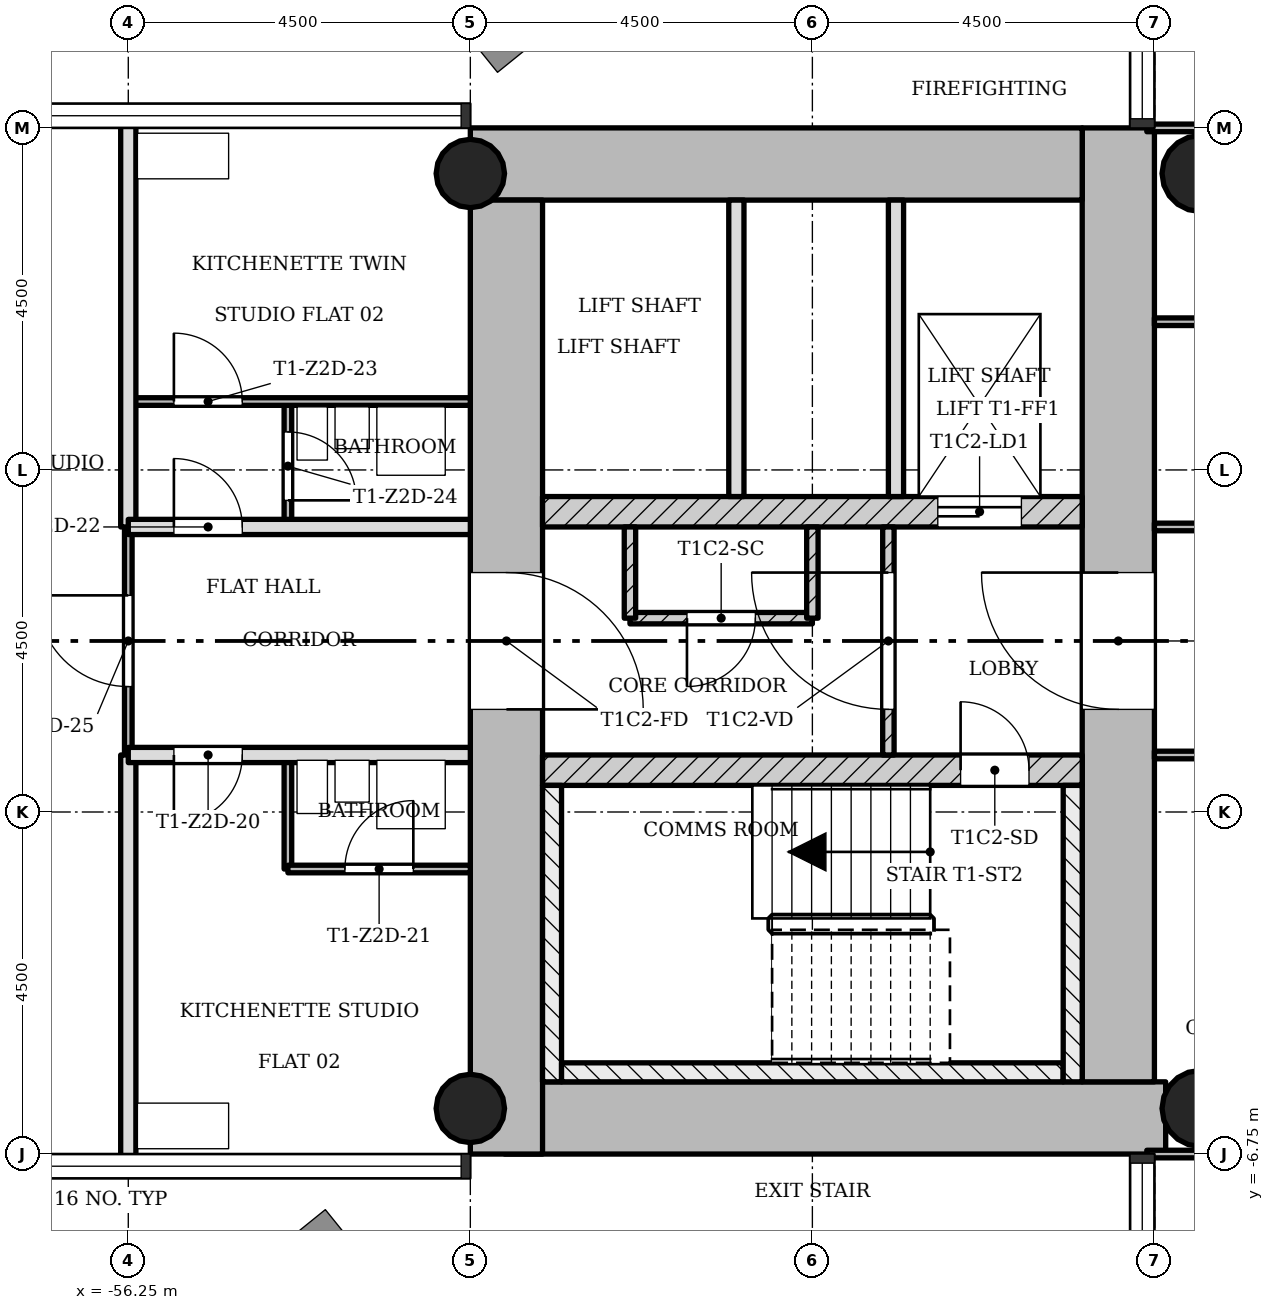
"""IFC4 building model, lengths in metres.
Left out: names, types, materials, properties, quantities, classifications, styles, units other than length and angle.
Written with IfcOpenShell. Run it as: python <this file> out.ifc"""

import sys

from ifc_helpers import new_model, si_unit, direction, frame, frame_2d, origin, origin_2d, place, context, subcontext, project, spatial, rectangle, hollow_circle, extrude, element, fill, save


model = new_model("IFC4")
c1 = context("Model", 3, precision=1e-05, world=origin(), true_north=direction((0.0, 1.0)))
c2 = subcontext(c1, "Body", "Model", "MODEL_VIEW")
j1 = project(units=[si_unit("LENGTHUNIT", "METRE"), si_unit("PLANEANGLEUNIT", "RADIAN")], contexts=[c1])
p1 = place(None, origin())
s1 = spatial("IfcSite", under=j1, at=p1, CompositionType="ELEMENT")
p2 = place(p1, origin())
s2 = spatial("IfcBuilding", under=s1, at=p2, CompositionType="ELEMENT")
p3 = place(p2, frame((0.0, 0.0, 120.8)))
s3 = spatial("IfcBuildingStorey", under=s2, at=p3, CompositionType="ELEMENT", Elevation=120.8)
p4 = place(p3, frame((-51.298, -6.275, 0.0), z_axis=(0.0, 0.0, 1.0), x_axis=(1.0, 0.0, 0.0)))
e1 = element("IfcWall", 1, at=p4, inside=s3, PredefinedType="SHEAR", context=c2, shape_type="SweptSolid", body=[
    extrude(rectangle(XDim=8.696, YDim=0.95, at=frame_2d((4.348, 0.0))), origin(), (0.0, 0.0, 1.0), 3.4),
])
p5 = place(p3, frame((-43.225, -5.8, 0.0), z_axis=(0.0, 0.0, 1.0), x_axis=(0.0, 1.0, 0.0)))
e2 = element("IfcWall", 2, at=p5, inside=s3, PredefinedType="SHEAR", context=c2, shape_type="SweptSolid", body=[
    extrude(rectangle(XDim=12.55, YDim=0.95, at=frame_2d((6.275, 0.0))), origin(), (0.0, 0.0, 1.0), 3.4),
])
p6 = place(p5, frame((4.9, 0.0, 0.0)))
e3 = element("IfcOpeningElement", 3, at=p6, cuts=e2, PredefinedType="OPENING", context=c2, shape_type="SweptSolid", body=[
    extrude(rectangle(XDim=1.8, YDim=2.1, at=frame_2d((0.9, 1.05))), frame((0.0, 0.485, 0.0), z_axis=(0.0, -1.0, 0.0), x_axis=(1.0, 0.0, 0.0)), (0.0, 0.0, 1.0), 0.97),
])
p7 = place(p3, frame((-43.7, 6.275, 0.0), z_axis=(0.0, 0.0, 1.0), x_axis=(-1.0, 0.0, 0.0)))
e4 = element("IfcWall", 4, at=p7, inside=s3, PredefinedType="SHEAR", context=c2, shape_type="SweptSolid", body=[
    extrude(rectangle(XDim=8.05, YDim=0.95, at=frame_2d((4.025, 0.0))), origin(), (0.0, 0.0, 1.0), 3.4),
])
p8 = place(p3, frame((-51.275, 5.8, 0.0), z_axis=(0.0, 0.0, 1.0), x_axis=(0.0, -1.0, 0.0)))
e5 = element("IfcWall", 5, at=p8, inside=s3, PredefinedType="SHEAR", context=c2, shape_type="SweptSolid", body=[
    extrude(rectangle(XDim=12.55, YDim=0.95, at=frame_2d((6.275, 0.0))), origin(), (0.0, 0.0, 1.0), 3.4),
])
p9 = place(p8, frame((4.9, 0.0, 0.0)))
e6 = element("IfcOpeningElement", 6, at=p9, cuts=e5, PredefinedType="OPENING", context=c2, shape_type="SweptSolid", body=[
    extrude(rectangle(XDim=1.8, YDim=2.1, at=frame_2d((0.9, 1.05))), frame((0.0, 0.485, 0.0), z_axis=(0.0, -1.0, 0.0), x_axis=(1.0, 0.0, 0.0)), (0.0, 0.0, 1.0), 0.97),
])
p10 = place(p3, frame((-50.8, -1.7, 0.0), z_axis=(0.0, 0.0, 1.0), x_axis=(1.0, 0.0, 0.0)))
e7 = element("IfcWall", 7, at=p10, inside=s3, PredefinedType="SHEAR", context=c2, shape_type="SweptSolid", body=[
    extrude(rectangle(XDim=7.1, YDim=0.4, at=frame_2d((3.55, 0.0))), origin(), (0.0, 0.0, 1.0), 3.4),
])
p11 = place(p10, frame((5.5, 0.0, 0.0)))
e8 = element("IfcOpeningElement", 8, at=p11, cuts=e7, PredefinedType="OPENING", context=c2, shape_type="SweptSolid", body=[
    extrude(rectangle(XDim=0.9, YDim=2.1, at=frame_2d((0.45, 1.05))), frame((0.0, 0.21, 0.0), z_axis=(0.0, -1.0, 0.0), x_axis=(1.0, 0.0, 0.0)), (0.0, 0.0, 1.0), 0.42),
])
p12 = place(p3, frame((-50.8, 1.7, 0.0), z_axis=(0.0, 0.0, 1.0), x_axis=(1.0, 0.0, 0.0)))
e9 = element("IfcWall", 9, at=p12, inside=s3, PredefinedType="SHEAR", context=c2, shape_type="SweptSolid", body=[
    extrude(rectangle(XDim=7.1, YDim=0.4, at=frame_2d((3.55, 0.0))), origin(), (0.0, 0.0, 1.0), 3.4),
])
p13 = place(p12, frame((5.2, 0.0, 0.0)))
e10 = element("IfcOpeningElement", 10, at=p13, cuts=e9, PredefinedType="OPENING", context=c2, shape_type="SweptSolid", body=[
    extrude(rectangle(XDim=1.1, YDim=2.1, at=frame_2d((0.55, 1.05))), frame((0.0, 0.21, 0.0), z_axis=(0.0, -1.0, 0.0), x_axis=(1.0, 0.0, 0.0)), (0.0, 0.0, 1.0), 0.42),
])
for number, where, z_axis, x_axis in (
    (11, (-51.75, -6.15, 0.0), (0.0, 0.0, 1.0), (1.0, 0.0, 0.0)),
    (12, (-51.75, 6.15, 0.0), (0.0, 0.0, 1.0), (1.0, 0.0, 0.0)),
):
    element("IfcColumn", number, at=place(p3, frame(where, z_axis=z_axis, x_axis=x_axis)), inside=s3, PredefinedType="COLUMN", context=c2, shape_type="SweptSolid", body=[
        extrude(hollow_circle(Radius=0.45, WallThickness=0.032, at=origin_2d()), origin(), (0.0, 0.0, 1.0), 3.4),
    ])
for number, where, z_axis, x_axis in (
    (13, (-42.15, -6.15, 0.0), (0.0, 0.0, 1.0), (1.0, 0.0, 0.0)),
    (14, (-42.15, 6.15, 0.0), (0.0, 0.0, 1.0), (1.0, 0.0, 0.0)),
):
    element("IfcColumn", number, at=place(p3, frame(where, z_axis=z_axis, x_axis=x_axis)), inside=s3, PredefinedType="COLUMN", context=c2, shape_type="SweptSolid", body=[
        extrude(hollow_circle(Radius=0.5, WallThickness=0.036, at=origin_2d()), origin(), (0.0, 0.0, 1.0), 3.4),
    ])
p14 = place(p3, frame((-46.25, 1.5, 0.0), z_axis=(0.0, 0.0, 1.0), x_axis=(0.0, -1.0, 0.0)))
e15 = element("IfcWall", 15, at=p14, inside=s3, PredefinedType="PARTITIONING", context=c2, shape_type="SweptSolid", body=[
    extrude(rectangle(XDim=3.0, YDim=0.15, at=frame_2d((1.5, 0.0))), origin(), (0.0, 0.0, 1.0), 3.0),
])
p15 = place(p14, frame((0.6, 0.0, 0.0)))
e16 = element("IfcOpeningElement", 16, at=p15, cuts=e15, PredefinedType="OPENING", context=c2, shape_type="SweptSolid", body=[
    extrude(rectangle(XDim=1.8, YDim=2.1, at=frame_2d((0.9, 1.05))), frame((0.0, 0.085, 0.0), z_axis=(0.0, -1.0, 0.0), x_axis=(1.0, 0.0, 0.0)), (0.0, 0.0, 1.0), 0.17),
])
for number, where, z_axis, x_axis in (
    (17, (-46.15, 5.8, 0.0), (0.0, 0.0, 1.0), (0.0, -1.0, 0.0)),
    (18, (-48.25, 5.8, 0.0), (0.0, 0.0, 1.0), (0.0, -1.0, 0.0)),
):
    element("IfcWall", number, at=place(p3, frame(where, z_axis=z_axis, x_axis=x_axis)), inside=s3, PredefinedType="SOLIDWALL", context=c2, shape_type="SweptSolid", body=[
        extrude(rectangle(XDim=3.9, YDim=0.2, at=frame_2d((1.95, 0.0))), origin(), (0.0, 0.0, 1.0), 3.0),
    ])
p16 = place(p3, frame((-47.25, 0.3, 0.0), z_axis=(0.0, 0.0, 1.0), x_axis=(-1.0, 0.0, 0.0)))
e19 = element("IfcWall", 19, at=p16, inside=s3, PredefinedType="PARTITIONING", context=c2, shape_type="SweptSolid", body=[
    extrude(rectangle(XDim=2.4, YDim=0.15, at=frame_2d((1.2, 0.0))), origin(), (0.0, 0.0, 1.0), 3.0),
])
p17 = place(p16, frame((0.75, 0.0, 0.0)))
e20 = element("IfcOpeningElement", 20, at=p17, cuts=e19, PredefinedType="OPENING", context=c2, shape_type="SweptSolid", body=[
    extrude(rectangle(XDim=0.9, YDim=2.1, at=frame_2d((0.45, 1.05))), frame((0.0, 0.085, 0.0), z_axis=(0.0, -1.0, 0.0), x_axis=(1.0, 0.0, 0.0)), (0.0, 0.0, 1.0), 0.17),
])
for number, where, z_axis, x_axis in (
    (21, (-47.25, 0.3, 0.0), (0.0, 0.0, 1.0), (0.0, 1.0, 0.0)),
    (22, (-49.65, 0.3, 0.0), (0.0, 0.0, 1.0), (0.0, 1.0, 0.0)),
):
    element("IfcWall", number, at=place(p3, frame(where, z_axis=z_axis, x_axis=x_axis)), inside=s3, PredefinedType="PARTITIONING", context=c2, shape_type="SweptSolid", body=[
        extrude(rectangle(XDim=1.2, YDim=0.15, at=frame_2d((0.6, 0.0))), origin(), (0.0, 0.0, 1.0), 3.0),
    ])
p18 = place(p3, frame((-56.25, -1.5, 0.0), z_axis=(0.0, 0.0, 1.0), x_axis=(0.0, 1.0, 0.0)))
e23 = element("IfcWall", 23, at=p18, inside=s3, PredefinedType="PARTITIONING", context=c2, shape_type="SweptSolid", body=[
    extrude(rectangle(XDim=3.0, YDim=0.1, at=frame_2d((1.5, 0.0))), origin(), (0.0, 0.0, 1.0), 3.0),
])
p19 = place(p18, frame((0.9, 0.0, 0.0)))
e24 = element("IfcOpeningElement", 24, at=p19, cuts=e23, PredefinedType="OPENING", context=c2, shape_type="SweptSolid", body=[
    extrude(rectangle(XDim=1.2, YDim=2.1, at=frame_2d((0.6, 1.05))), frame((0.0, 0.06, 0.0), z_axis=(0.0, -1.0, 0.0), x_axis=(1.0, 0.0, 0.0)), (0.0, 0.0, 1.0), 0.12),
])
for number, where, z_axis, x_axis in (
    (25, (-56.25, -6.85, 0.0), (0.0, 0.0, 1.0), (0.0, 1.0, 0.0)),
    (26, (-56.25, 1.5, 0.0), (0.0, 0.0, 1.0), (0.0, 1.0, 0.0)),
):
    element("IfcWall", number, at=place(p3, frame(where, z_axis=z_axis, x_axis=x_axis)), inside=s3, PredefinedType="SOLIDWALL", context=c2, shape_type="SweptSolid", body=[
        extrude(rectangle(XDim=5.35, YDim=0.2, at=frame_2d((2.675, 0.0))), origin(), (0.0, 0.0, 1.0), 3.0),
    ])
p20 = place(p3, frame((-54.15, -3.0, 0.0), z_axis=(0.0, 0.0, 1.0), x_axis=(0.0, 1.0, 0.0)))
e27 = element("IfcWall", 27, at=p20, inside=s3, PredefinedType="PARTITIONING", context=c2, shape_type="SweptSolid", body=[
    extrude(rectangle(XDim=1.5, YDim=0.1, at=frame_2d((0.75, 0.0))), origin(), (0.0, 0.0, 1.0), 3.0),
])
p21 = place(p3, frame((-54.15, 1.5, 0.0), z_axis=(0.0, 0.0, 1.0), x_axis=(0.0, 1.0, 0.0)))
e28 = element("IfcWall", 28, at=p21, inside=s3, PredefinedType="PARTITIONING", context=c2, shape_type="SweptSolid", body=[
    extrude(rectangle(XDim=1.65, YDim=0.1, at=frame_2d((0.825, 0.0))), origin(), (0.0, 0.0, 1.0), 3.0),
])
p22 = place(p21, frame((0.35, 0.0, 0.0)))
e29 = element("IfcOpeningElement", 29, at=p22, cuts=e28, PredefinedType="OPENING", context=c2, shape_type="SweptSolid", body=[
    extrude(rectangle(XDim=0.9, YDim=2.1, at=frame_2d((0.45, 1.05))), frame((0.0, 0.06, 0.0), z_axis=(0.0, -1.0, 0.0), x_axis=(1.0, 0.0, 0.0)), (0.0, 0.0, 1.0), 0.12),
])
p23 = place(p3, frame((-42.85, -6.75, 0.0), z_axis=(0.0, 0.0, 1.0), x_axis=(1.0, 0.0, 0.0)))
e30 = element("IfcWall", 30, at=p23, inside=s3, PredefinedType="PARTITIONING", context=c2, shape_type="SweptSolid", body=[
    extrude(rectangle(XDim=5.95, YDim=0.1, at=frame_2d((2.975, 0.0))), origin(), (0.0, 0.0, 1.0), 3.0),
])
p24 = place(p3, frame((-54.15, -3.0, 0.0), z_axis=(0.0, 0.0, 1.0), x_axis=(1.0, 0.0, 0.0)))
e31 = element("IfcWall", 31, at=p24, inside=s3, PredefinedType="PARTITIONING", context=c2, shape_type="SweptSolid", body=[
    extrude(rectangle(XDim=2.4, YDim=0.1, at=frame_2d((1.2, 0.0))), origin(), (0.0, 0.0, 1.0), 3.0),
])
p25 = place(p24, frame((0.75, 0.0, 0.0)))
e32 = element("IfcOpeningElement", 32, at=p25, cuts=e31, PredefinedType="OPENING", context=c2, shape_type="SweptSolid", body=[
    extrude(rectangle(XDim=0.9, YDim=2.1, at=frame_2d((0.45, 1.05))), frame((0.0, 0.06, 0.0), z_axis=(0.0, -1.0, 0.0), x_axis=(1.0, 0.0, 0.0)), (0.0, 0.0, 1.0), 0.12),
])
p26 = place(p3, frame((-42.75, -1.5, 0.0), z_axis=(0.0, 0.0, 1.0), x_axis=(1.0, 0.0, 0.0)))
e33 = element("IfcWall", 33, at=p26, inside=s3, PredefinedType="PARTITIONING", context=c2, shape_type="SweptSolid", body=[
    extrude(rectangle(XDim=5.85, YDim=0.1, at=frame_2d((2.925, 0.0))), origin(), (0.0, 0.0, 1.0), 3.0),
])
p27 = place(p26, frame((2.475, 0.0, 0.0)))
e34 = element("IfcOpeningElement", 34, at=p27, cuts=e33, PredefinedType="OPENING", context=c2, shape_type="SweptSolid", body=[
    extrude(rectangle(XDim=0.9, YDim=2.1, at=frame_2d((0.45, 1.05))), frame((0.0, 0.06, 0.0), z_axis=(0.0, -1.0, 0.0), x_axis=(1.0, 0.0, 0.0)), (0.0, 0.0, 1.0), 0.12),
])
p28 = place(p3, frame((-56.25, -1.5, 0.0), z_axis=(0.0, 0.0, 1.0), x_axis=(1.0, 0.0, 0.0)))
e35 = element("IfcWall", 35, at=p28, inside=s3, PredefinedType="SOLIDWALL", context=c2, shape_type="SweptSolid", body=[
    extrude(rectangle(XDim=4.5, YDim=0.2, at=frame_2d((2.25, 0.0))), origin(), (0.0, 0.0, 1.0), 3.0),
])
p29 = place(p28, frame((0.6, 0.0, 0.0)))
e36 = element("IfcOpeningElement", 36, at=p29, cuts=e35, PredefinedType="OPENING", context=c2, shape_type="SweptSolid", body=[
    extrude(rectangle(XDim=0.9, YDim=2.1, at=frame_2d((0.45, 1.05))), frame((0.0, 0.11, 0.0), z_axis=(0.0, -1.0, 0.0), x_axis=(1.0, 0.0, 0.0)), (0.0, 0.0, 1.0), 0.22),
])
p30 = place(p3, frame((-42.75, 1.5, 0.0), z_axis=(0.0, 0.0, 1.0), x_axis=(1.0, 0.0, 0.0)))
e37 = element("IfcWall", 37, at=p30, inside=s3, PredefinedType="PARTITIONING", context=c2, shape_type="SweptSolid", body=[
    extrude(rectangle(XDim=5.85, YDim=0.1, at=frame_2d((2.925, 0.0))), origin(), (0.0, 0.0, 1.0), 3.0),
])
p31 = place(p30, frame((2.475, 0.0, 0.0)))
e38 = element("IfcOpeningElement", 38, at=p31, cuts=e37, PredefinedType="OPENING", context=c2, shape_type="SweptSolid", body=[
    extrude(rectangle(XDim=0.9, YDim=2.1, at=frame_2d((0.45, 1.05))), frame((0.0, 0.06, 0.0), z_axis=(0.0, -1.0, 0.0), x_axis=(1.0, 0.0, 0.0)), (0.0, 0.0, 1.0), 0.12),
])
p32 = place(p3, frame((-56.25, 1.5, 0.0), z_axis=(0.0, 0.0, 1.0), x_axis=(1.0, 0.0, 0.0)))
e39 = element("IfcWall", 39, at=p32, inside=s3, PredefinedType="SOLIDWALL", context=c2, shape_type="SweptSolid", body=[
    extrude(rectangle(XDim=4.5, YDim=0.2, at=frame_2d((2.25, 0.0))), origin(), (0.0, 0.0, 1.0), 3.0),
])
p33 = place(p32, frame((0.6, 0.0, 0.0)))
e40 = element("IfcOpeningElement", 40, at=p33, cuts=e39, PredefinedType="OPENING", context=c2, shape_type="SweptSolid", body=[
    extrude(rectangle(XDim=0.9, YDim=2.1, at=frame_2d((0.45, 1.05))), frame((0.0, 0.11, 0.0), z_axis=(0.0, -1.0, 0.0), x_axis=(1.0, 0.0, 0.0)), (0.0, 0.0, 1.0), 0.22),
])
p34 = place(p3, frame((-56.25, 3.15, 0.0), z_axis=(0.0, 0.0, 1.0), x_axis=(1.0, 0.0, 0.0)))
e41 = element("IfcWall", 41, at=p34, inside=s3, PredefinedType="PARTITIONING", context=c2, shape_type="SweptSolid", body=[
    extrude(rectangle(XDim=4.5, YDim=0.1, at=frame_2d((2.25, 0.0))), origin(), (0.0, 0.0, 1.0), 3.0),
])
p35 = place(p34, frame((0.6, 0.0, 0.0)))
e42 = element("IfcOpeningElement", 42, at=p35, cuts=e41, PredefinedType="OPENING", context=c2, shape_type="SweptSolid", body=[
    extrude(rectangle(XDim=0.9, YDim=2.1, at=frame_2d((0.45, 1.05))), frame((0.0, 0.06, 0.0), z_axis=(0.0, -1.0, 0.0), x_axis=(1.0, 0.0, 0.0)), (0.0, 0.0, 1.0), 0.12),
])
p36 = place(p3, frame((-42.75, 4.2, 0.0), z_axis=(0.0, 0.0, 1.0), x_axis=(1.0, 0.0, 0.0)))
e43 = element("IfcWall", 43, at=p36, inside=s3, PredefinedType="PARTITIONING", context=c2, shape_type="SweptSolid", body=[
    extrude(rectangle(XDim=5.85, YDim=0.1, at=frame_2d((2.925, 0.0))), origin(), (0.0, 0.0, 1.0), 3.0),
])
p37 = place(p3, frame((-42.85, 6.75, 0.0), z_axis=(0.0, 0.0, 1.0), x_axis=(1.0, 0.0, 0.0)))
e44 = element("IfcWall", 44, at=p37, inside=s3, PredefinedType="PARTITIONING", context=c2, shape_type="SweptSolid", body=[
    extrude(rectangle(XDim=5.95, YDim=0.1, at=frame_2d((2.975, 0.0))), origin(), (0.0, 0.0, 1.0), 3.0),
])
p38 = place(p3, frame((-50.675, -1.9, 0.0), z_axis=(0.0, 0.0, 1.0), x_axis=(0.0, -1.0, 0.0)))
e45 = element("IfcWall", 45, at=p38, inside=s3, PredefinedType="SHEAR", context=c2, shape_type="SweptSolid", body=[
    extrude(rectangle(XDim=3.9, YDim=0.25, at=frame_2d((1.95, 0.0))), origin(), (0.0, 0.0, 1.0), 3.4),
])
p39 = place(p3, frame((-43.95, -5.675, 0.0), z_axis=(0.0, 0.0, 1.0), x_axis=(-1.0, 0.0, 0.0)))
e46 = element("IfcWall", 46, at=p39, inside=s3, PredefinedType="SHEAR", context=c2, shape_type="SweptSolid", body=[
    extrude(rectangle(XDim=6.6, YDim=0.25, at=frame_2d((3.3, 0.0))), origin(), (0.0, 0.0, 1.0), 3.4),
])
p40 = place(p3, frame((-43.825, -1.9, 0.0), z_axis=(0.0, 0.0, 1.0), x_axis=(0.0, -1.0, 0.0)))
e47 = element("IfcWall", 47, at=p40, inside=s3, PredefinedType="SHEAR", context=c2, shape_type="SweptSolid", body=[
    extrude(rectangle(XDim=3.9, YDim=0.25, at=frame_2d((1.95, 0.0))), origin(), (0.0, 0.0, 1.0), 3.4),
])
p41 = place(p15, origin())
e48 = element("IfcDoor", 48, at=p41, inside=s3, OperationType="SINGLE_SWING_LEFT", PredefinedType="DOOR", context=c2, shape_type="SweptSolid", body=[
    extrude(rectangle(XDim=1.8, YDim=2.1, at=frame_2d((0.9, 1.05))), frame((0.0, 0.025, 0.0), z_axis=(0.0, -1.0, 0.0), x_axis=(1.0, 0.0, 0.0)), (0.0, 0.0, 1.0), 0.05),
])
fill(e16, e48)
p42 = place(p17, origin())
e49 = element("IfcDoor", 49, at=p42, inside=s3, OperationType="SINGLE_SWING_LEFT", PredefinedType="DOOR", context=c2, shape_type="SweptSolid", body=[
    extrude(rectangle(XDim=0.9, YDim=2.1, at=frame_2d((0.45, 1.05))), frame((0.0, 0.025, 0.0), z_axis=(0.0, -1.0, 0.0), x_axis=(1.0, 0.0, 0.0)), (0.0, 0.0, 1.0), 0.05),
])
fill(e20, e49)
p43 = place(p29, origin())
e50 = element("IfcDoor", 50, at=p43, inside=s3, OperationType="SINGLE_SWING_LEFT", PredefinedType="DOOR", context=c2, shape_type="SweptSolid", body=[
    extrude(rectangle(XDim=0.9, YDim=2.1, at=frame_2d((0.45, 1.05))), frame((0.0, 0.025, 0.0), z_axis=(0.0, -1.0, 0.0), x_axis=(1.0, 0.0, 0.0)), (0.0, 0.0, 1.0), 0.05),
])
fill(e36, e50)
p44 = place(p25, origin())
e51 = element("IfcDoor", 51, at=p44, inside=s3, OperationType="SINGLE_SWING_LEFT", PredefinedType="DOOR", context=c2, shape_type="SweptSolid", body=[
    extrude(rectangle(XDim=0.9, YDim=2.1, at=frame_2d((0.45, 1.05))), frame((0.0, 0.025, 0.0), z_axis=(0.0, -1.0, 0.0), x_axis=(1.0, 0.0, 0.0)), (0.0, 0.0, 1.0), 0.05),
])
fill(e32, e51)
p45 = place(p33, origin())
e52 = element("IfcDoor", 52, at=p45, inside=s3, OperationType="SINGLE_SWING_RIGHT", PredefinedType="DOOR", context=c2, shape_type="SweptSolid", body=[
    extrude(rectangle(XDim=0.9, YDim=2.1, at=frame_2d((0.45, 1.05))), frame((0.0, 0.025, 0.0), z_axis=(0.0, -1.0, 0.0), x_axis=(1.0, 0.0, 0.0)), (0.0, 0.0, 1.0), 0.05),
])
fill(e40, e52)
p46 = place(p35, origin())
e53 = element("IfcDoor", 53, at=p46, inside=s3, OperationType="SINGLE_SWING_RIGHT", PredefinedType="DOOR", context=c2, shape_type="SweptSolid", body=[
    extrude(rectangle(XDim=0.9, YDim=2.1, at=frame_2d((0.45, 1.05))), frame((0.0, 0.025, 0.0), z_axis=(0.0, -1.0, 0.0), x_axis=(1.0, 0.0, 0.0)), (0.0, 0.0, 1.0), 0.05),
])
fill(e42, e53)
p47 = place(p22, origin())
e54 = element("IfcDoor", 54, at=p47, inside=s3, OperationType="SINGLE_SWING_LEFT", PredefinedType="DOOR", context=c2, shape_type="SweptSolid", body=[
    extrude(rectangle(XDim=0.9, YDim=2.1, at=frame_2d((0.45, 1.05))), frame((0.0, 0.025, 0.0), z_axis=(0.0, -1.0, 0.0), x_axis=(1.0, 0.0, 0.0)), (0.0, 0.0, 1.0), 0.05),
])
fill(e29, e54)
p48 = place(p19, origin())
e55 = element("IfcDoor", 55, at=p48, inside=s3, OperationType="SINGLE_SWING_LEFT", PredefinedType="DOOR", context=c2, shape_type="SweptSolid", body=[
    extrude(rectangle(XDim=1.2, YDim=2.1, at=frame_2d((0.6, 1.05))), frame((0.0, 0.025, 0.0), z_axis=(0.0, -1.0, 0.0), x_axis=(1.0, 0.0, 0.0)), (0.0, 0.0, 1.0), 0.05),
])
fill(e24, e55)
p49 = place(p11, origin())
e56 = element("IfcDoor", 56, at=p49, inside=s3, OperationType="SINGLE_SWING_RIGHT", PredefinedType="DOOR", context=c2, shape_type="SweptSolid", body=[
    extrude(rectangle(XDim=0.9, YDim=2.1, at=frame_2d((0.45, 1.05))), frame((0.0, 0.025, 0.0), z_axis=(0.0, -1.0, 0.0), x_axis=(1.0, 0.0, 0.0)), (0.0, 0.0, 1.0), 0.05),
])
fill(e8, e56)
p50 = place(p13, origin())
e57 = element("IfcDoor", 57, at=p50, inside=s3, OperationType="SLIDING_TO_LEFT", PredefinedType="DOOR", context=c2, shape_type="SweptSolid", body=[
    extrude(rectangle(XDim=1.1, YDim=2.1, at=frame_2d((0.55, 1.05))), frame((0.0, 0.025, 0.0), z_axis=(0.0, -1.0, 0.0), x_axis=(1.0, 0.0, 0.0)), (0.0, 0.0, 1.0), 0.05),
])
fill(e10, e57)
p51 = place(p6, origin())
e58 = element("IfcDoor", 58, at=p51, inside=s3, OperationType="SINGLE_SWING_LEFT", PredefinedType="DOOR", context=c2, shape_type="SweptSolid", body=[
    extrude(rectangle(XDim=1.8, YDim=2.1, at=frame_2d((0.9, 1.05))), frame((0.0, 0.025, 0.0), z_axis=(0.0, -1.0, 0.0), x_axis=(1.0, 0.0, 0.0)), (0.0, 0.0, 1.0), 0.05),
])
fill(e3, e58)
p52 = place(p9, origin())
e59 = element("IfcDoor", 59, at=p52, inside=s3, OperationType="SINGLE_SWING_LEFT", PredefinedType="DOOR", context=c2, shape_type="SweptSolid", body=[
    extrude(rectangle(XDim=1.8, YDim=2.1, at=frame_2d((0.9, 1.05))), frame((0.0, 0.025, 0.0), z_axis=(0.0, -1.0, 0.0), x_axis=(1.0, 0.0, 0.0)), (0.0, 0.0, 1.0), 0.05),
])
fill(e6, e59)
save(model, sys.argv[1])
